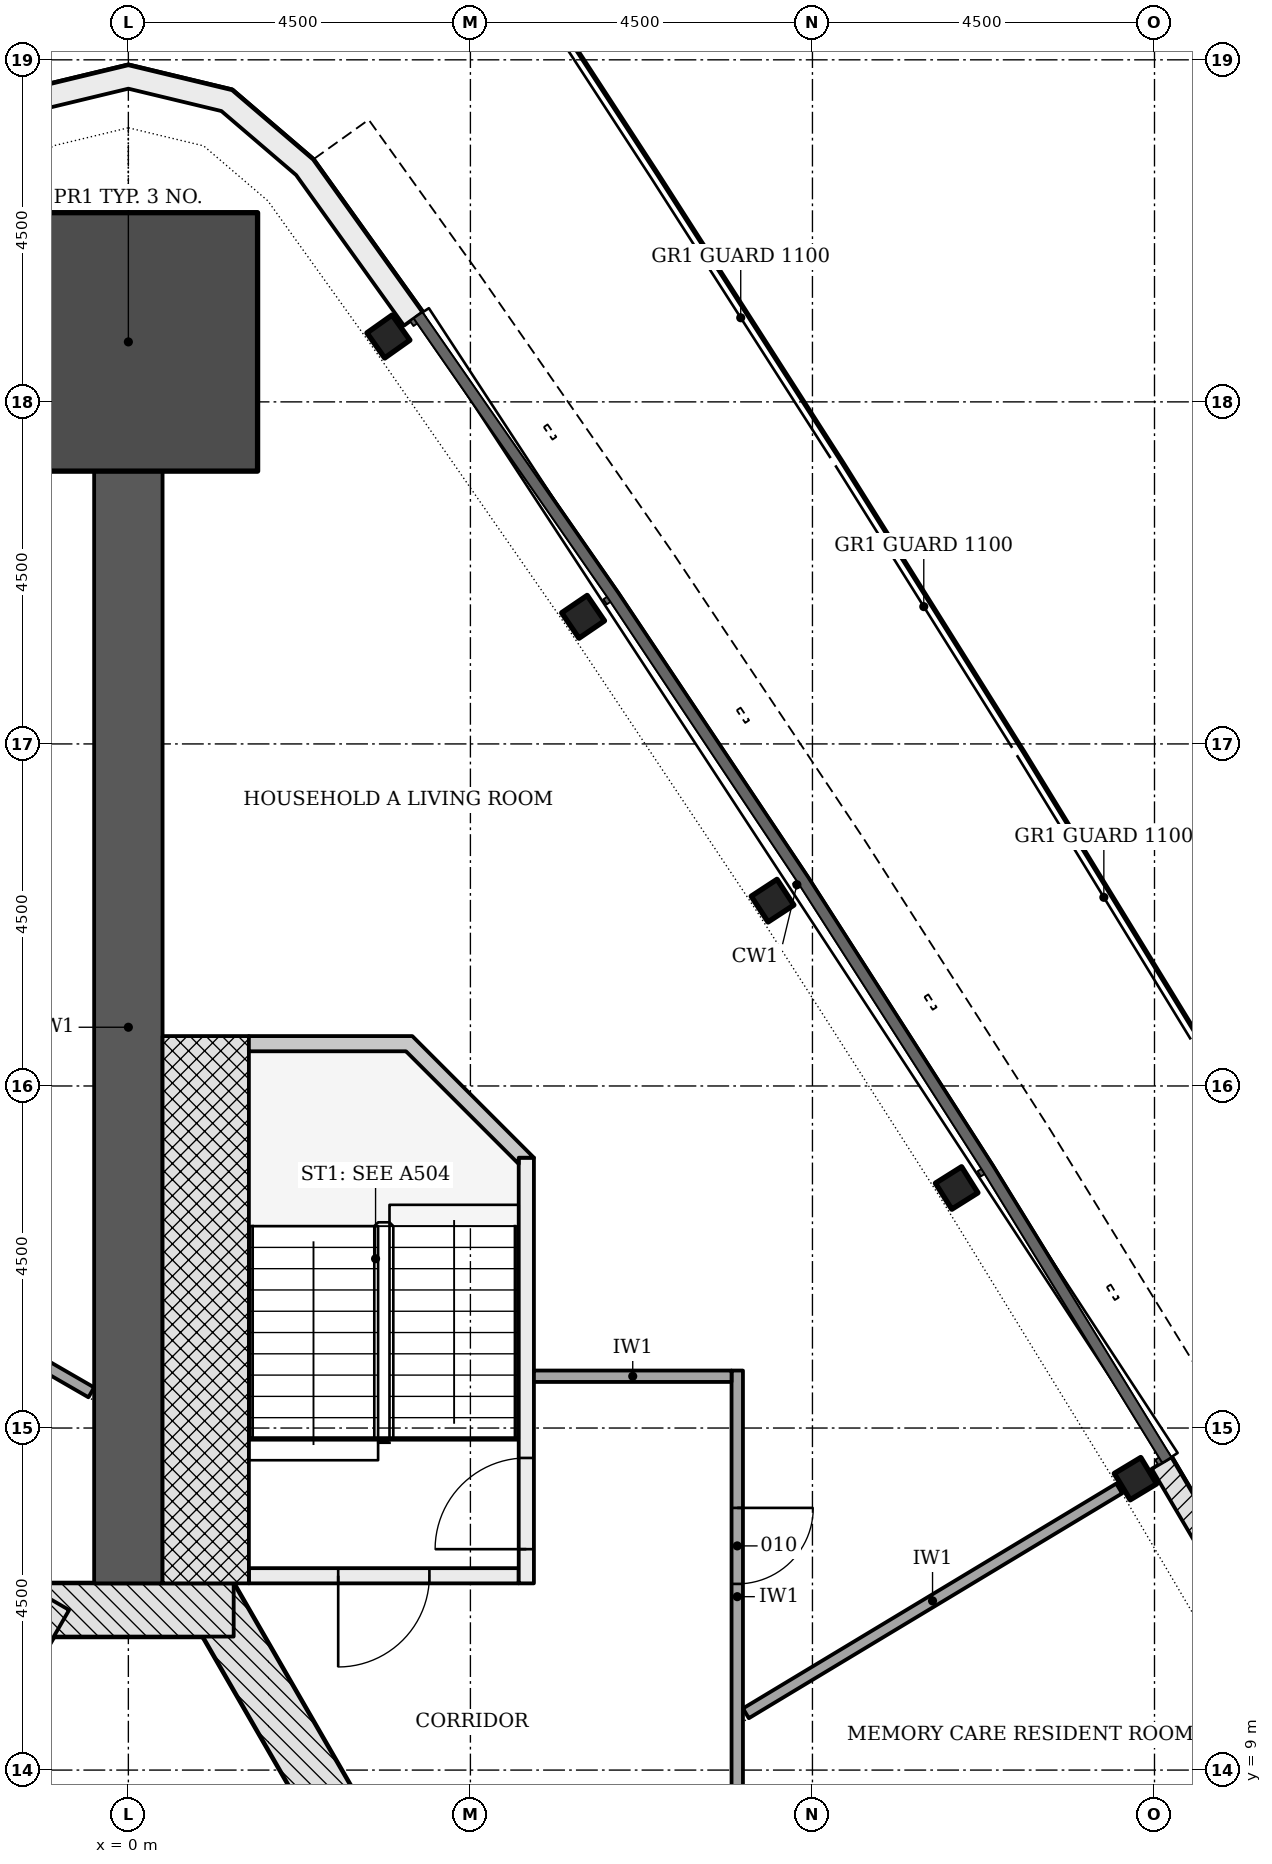
"""IFC4 building model, lengths in metres.
Left out: names, types, materials, properties, quantities, classifications, styles, units other than length and angle.
Written with IfcOpenShell. Run it as: python <this file> out.ifc"""

import sys

from ifc_helpers import new_model, si_unit, direction, frame, frame_2d, origin, origin_2d, place, context, subcontext, project, spatial, polyline, rectangle, i_section, outline, extrude, element, fill, save


model = new_model("IFC4")
c1 = context("Model", 3, precision=1e-05, world=origin(), true_north=direction((0.0, 1.0)))
c2 = subcontext(c1, "Body", "Model", "MODEL_VIEW")
j1 = project(units=[si_unit("LENGTHUNIT", "METRE"), si_unit("PLANEANGLEUNIT", "RADIAN")], contexts=[c1])
p1 = place(None, origin())
s1 = spatial("IfcSite", under=j1, at=p1, CompositionType="ELEMENT")
p2 = place(p1, origin())
s2 = spatial("IfcBuilding", under=s1, at=p2, CompositionType="ELEMENT")
p3 = place(p2, frame((0.0, 0.0, 24.0)))
s3 = spatial("IfcBuildingStorey", under=s2, at=p3, CompositionType="ELEMENT", Elevation=24.0)
p4 = place(p3, frame((10.311, -4.703, -0.2), z_axis=(0.0, 0.0, 1.0), x_axis=(-0.500001446645, 0.866024568562, 0.0)))
e1 = element("IfcWall", 1, at=p4, inside=s3, PredefinedType="SHEAR", context=c2, shape_type="SweptSolid", body=[
    extrude(rectangle(XDim=18.458, YDim=0.7, at=frame_2d((9.229, 0.0))), origin(), (0.0, 0.0, 1.0), 3.6),
])
p5 = place(p4, frame((8.7, 0.0, 0.2)))
e2 = element("IfcOpeningElement", 2, at=p5, cuts=e1, PredefinedType="OPENING", context=c2, shape_type="SweptSolid", body=[
    extrude(rectangle(XDim=1.0, YDim=2.1, at=frame_2d((0.5, 1.05))), frame((0.0, 0.36, 0.0), z_axis=(0.0, -1.0, 0.0), x_axis=(1.0, 0.0, 0.0)), (0.0, 0.0, 1.0), 0.72),
])
p6 = place(p4, frame((3.99, 0.0, 0.2)))
e3 = element("IfcOpeningElement", 3, at=p6, cuts=e1, PredefinedType="OPENING", context=c2, shape_type="SweptSolid", body=[
    extrude(rectangle(XDim=0.9, YDim=2.1, at=frame_2d((0.45, 1.05))), frame((0.0, 0.36, 0.0), z_axis=(0.0, -1.0, 0.0), x_axis=(1.0, 0.0, 0.0)), (0.0, 0.0, 1.0), 0.72),
])
p7 = place(p4, frame((13.539, 0.0, 0.2)))
e4 = element("IfcOpeningElement", 4, at=p7, cuts=e1, PredefinedType="OPENING", context=c2, shape_type="SweptSolid", body=[
    extrude(rectangle(XDim=0.9, YDim=2.1, at=frame_2d((0.45, 1.05))), frame((0.0, 0.36, 0.0), z_axis=(0.0, -1.0, 0.0), x_axis=(1.0, 0.0, 0.0)), (0.0, 0.0, 1.0), 0.72),
])
p8 = place(p3, frame((1.386, 11.106, -0.2), z_axis=(0.0, 0.0, 1.0), x_axis=(-1.0, 0.0, 0.0)))
e5 = element("IfcWall", 5, at=p8, inside=s3, PredefinedType="SHEAR", context=c2, shape_type="SweptSolid", body=[
    extrude(rectangle(XDim=2.771, YDim=0.7, at=frame_2d((1.386, 0.0))), origin(), (0.0, 0.0, 1.0), 3.6),
])
p9 = place(p3, frame((-1.083, 11.281, -0.2), z_axis=(0.0, 0.0, 1.0), x_axis=(-0.500001446645, -0.866024568562, 0.0)))
e6 = element("IfcWall", 6, at=p9, inside=s3, PredefinedType="SHEAR", context=c2, shape_type="SweptSolid", body=[
    extrude(rectangle(XDim=18.458, YDim=0.7, at=frame_2d((9.229, 0.0))), origin(), (0.0, 0.0, 1.0), 3.6),
])
p10 = place(p9, frame((8.979, 0.0, 0.2)))
e7 = element("IfcOpeningElement", 7, at=p10, cuts=e6, PredefinedType="OPENING", context=c2, shape_type="SweptSolid", body=[
    extrude(rectangle(XDim=1.2, YDim=2.1, at=frame_2d((0.6, 1.05))), frame((0.0, 0.36, 0.0), z_axis=(0.0, -1.0, 0.0), x_axis=(1.0, 0.0, 0.0)), (0.0, 0.0, 1.0), 0.72),
])
p11 = place(p9, frame((11.029, 0.0, 0.2)))
e8 = element("IfcOpeningElement", 8, at=p11, cuts=e6, PredefinedType="OPENING", context=c2, shape_type="SweptSolid", body=[
    extrude(rectangle(XDim=1.2, YDim=2.1, at=frame_2d((0.6, 1.05))), frame((0.0, 0.36, 0.0), z_axis=(0.0, -1.0, 0.0), x_axis=(1.0, 0.0, 0.0)), (0.0, 0.0, 1.0), 0.72),
])
p12 = place(p3, frame((0.0, 11.456, -0.2), z_axis=(0.0, 0.0, 1.0), x_axis=(0.0, 1.0, 0.0)))
e9 = element("IfcWall", 9, at=p12, inside=s3, PredefinedType="SHEAR", context=c2, shape_type="SweptSolid", body=[
    extrude(rectangle(XDim=14.633, YDim=0.9, at=frame_2d((7.316, 0.0))), origin(), (0.0, 0.0, 1.0), 3.6),
])
p13 = place(p3, frame((0.0, 27.789, -0.2), z_axis=(0.0, 0.0, 1.0), x_axis=(0.0, 1.0, 0.0)))
e10 = element("IfcColumn", 10, at=p13, inside=s3, PredefinedType="COLUMN", context=c2, shape_type="SweptSolid", body=[
    extrude(rectangle(XDim=3.4, YDim=3.4, at=origin_2d()), origin(), (0.0, 0.0, 1.0), 3.6),
])
for number, where, z_axis, x_axis in (
    (11, (13.25, 12.834, -0.2), (0.0, 0.0, 1.0), (-0.516, 0.857, 0.0)),
    (12, (10.897, 16.658, -0.2), (0.0, 0.0, 1.0), (-0.532, 0.847, 0.0)),
    (13, (8.475, 20.438, -0.2), (0.0, 0.0, 1.0), (-0.547, 0.837, 0.0)),
    (14, (5.982, 24.172, -0.2), (0.0, 0.0, 1.0), (-0.563, 0.827, 0.0)),
    (15, (3.421, 27.86, -0.2), (0.0, 0.0, 1.0), (-0.578, 0.816, 0.0)),
):
    element("IfcColumn", number, at=place(p3, frame(where, z_axis=z_axis, x_axis=x_axis)), inside=s3, PredefinedType="COLUMN", context=c2, shape_type="SweptSolid", body=[
        extrude(i_section(OverallWidth=0.404, OverallDepth=0.406, WebThickness=0.027, FlangeThickness=0.044, FilletRadius=0.015, at=origin_2d()), origin(), (0.0, 0.0, 1.0), 3.6),
    ])
p14 = place(p3, frame((13.593, 13.04, 0.0), z_axis=(0.0, 0.0, 1.0), x_axis=(0.507980887805, -0.861368340273, 0.0)))
e16 = element("IfcWall", 16, at=p14, inside=s3, PredefinedType="NOTDEFINED", context=c2, shape_type="SweptSolid", body=[
    extrude(rectangle(XDim=4.496, YDim=0.3, at=frame_2d((2.248, 0.0))), origin(), (0.0, 0.0, 1.0), 3.3),
])
p15 = place(p14, frame((1.648, 0.0, 0.0)))
e17 = element("IfcOpeningElement", 17, at=p15, cuts=e16, PredefinedType="OPENING", context=c2, shape_type="SweptSolid", body=[
    extrude(rectangle(XDim=1.2, YDim=2.4, at=frame_2d((0.6, 1.2))), frame((0.0, 0.16, 0.0), z_axis=(0.0, -1.0, 0.0), x_axis=(1.0, 0.0, 0.0)), (0.0, 0.0, 1.0), 0.32),
])
p16 = place(p3, origin())
e18 = element("IfcWall", 18, at=p16, inside=s3, PredefinedType="NOTDEFINED", context=c2, shape_type="SweptSolid", body=[
    extrude(outline(polyline([(3.87, 28.178), (2.43, 30.188), (1.364, 31.101), (0.0, 31.429), (-1.364, 31.101), (-2.43, 30.188), (-3.87, 28.178), (-3.626, 28.003), (-2.208, 29.984), (-1.224, 30.826), (0.0, 31.121), (1.224, 30.826), (2.208, 29.984), (3.626, 28.003), (3.87, 28.178)])), origin(), (0.0, 0.0, 1.0), 3.3),
])
p17 = place(p3, frame((5.135, 11.556, -0.2), z_axis=(0.0, 0.0, 1.0), x_axis=(-1.0, 0.0, 0.0)))
e19 = element("IfcWall", 19, at=p17, inside=s3, PredefinedType="SHEAR", context=c2, shape_type="SweptSolid", body=[
    extrude(rectangle(XDim=3.55, YDim=0.2, at=frame_2d((1.775, 0.0))), origin(), (0.0, 0.0, 1.0), 3.6),
])
p18 = place(p17, frame((1.175, 0.0, 0.2)))
e20 = element("IfcOpeningElement", 20, at=p18, cuts=e19, PredefinedType="OPENING", context=c2, shape_type="SweptSolid", body=[
    extrude(rectangle(XDim=1.2, YDim=2.1, at=frame_2d((0.6, 1.05))), frame((0.0, 0.11, 0.0), z_axis=(0.0, -1.0, 0.0), x_axis=(1.0, 0.0, 0.0)), (0.0, 0.0, 1.0), 0.22),
])
p19 = place(p3, frame((5.236, 11.456, -0.2), z_axis=(0.0, 0.0, 1.0), x_axis=(0.0, 1.0, 0.0)))
e21 = element("IfcWall", 21, at=p19, inside=s3, PredefinedType="SHEAR", context=c2, shape_type="SweptSolid", body=[
    extrude(rectangle(XDim=5.6, YDim=0.2, at=frame_2d((2.8, 0.0))), origin(), (0.0, 0.0, 1.0), 3.6),
])
p20 = place(p19, frame((0.45, 0.0, 0.2)))
e22 = element("IfcOpeningElement", 22, at=p20, cuts=e21, PredefinedType="OPENING", context=c2, shape_type="SweptSolid", body=[
    extrude(rectangle(XDim=1.2, YDim=2.1, at=frame_2d((0.6, 1.05))), frame((0.0, 0.11, 0.0), z_axis=(0.0, -1.0, 0.0), x_axis=(1.0, 0.0, 0.0)), (0.0, 0.0, 1.0), 0.22),
])
p21 = place(p3, frame((1.018, 11.456, -0.2), z_axis=(0.0, 0.0, 1.0), x_axis=(0.0, 1.0, 0.0)))
e23 = element("IfcWall", 23, at=p21, inside=s3, PredefinedType="SHEAR", context=c2, shape_type="SweptSolid", body=[
    extrude(rectangle(XDim=7.2, YDim=1.136, at=frame_2d((3.6, 0.0))), origin(), (0.0, 0.0, 1.0), 3.6),
])
p22 = place(p3, frame((0.0, 0.0, -0.2)))
e24 = element("IfcWall", 24, at=p22, inside=s3, PredefinedType="SHEAR", context=c2, shape_type="SweptSolid", body=[
    extrude(outline(polyline([(5.336, 17.056), (3.736, 18.656), (1.586, 18.656), (1.586, 18.456), (3.653, 18.456), (5.135, 16.974), (5.135, 17.056), (5.135, 17.056), (5.135, 17.056), (5.135, 17.056), (5.135, 17.056), (5.135, 17.056), (5.135, 17.056), (5.135, 17.056), (5.135, 17.056), (5.135, 17.056), (5.135, 17.056), (5.135, 17.056), (5.135, 17.056), (5.135, 17.056), (5.135, 17.056), (5.135, 17.056), (5.135, 17.056), (5.336, 17.056)])), origin(), (0.0, 0.0, 1.0), 3.6),
])
p23 = place(p3, frame((8.01, 14.256, 0.0), z_axis=(0.0, 0.0, 1.0), x_axis=(0.0, -1.0, 0.0)))
e25 = element("IfcWall", 25, at=p23, inside=s3, PredefinedType="PARTITIONING", context=c2, shape_type="SweptSolid", body=[
    extrude(rectangle(XDim=5.95, YDim=0.15, at=frame_2d((2.975, 0.0))), origin(), (0.0, 0.0, 1.0), 2.768),
])
p24 = place(p23, frame((1.807, 0.0, 0.0)))
e26 = element("IfcOpeningElement", 26, at=p24, cuts=e25, PredefinedType="OPENING", context=c2, shape_type="SweptSolid", body=[
    extrude(rectangle(XDim=1.0, YDim=2.1, at=frame_2d((0.5, 1.05))), frame((0.0, 0.085, 0.0), z_axis=(0.0, -1.0, 0.0), x_axis=(1.0, 0.0, 0.0)), (0.0, 0.0, 1.0), 0.17),
])
p25 = place(p3, frame((-5.312, 16.755, 0.0), z_axis=(0.0, 0.0, 1.0), x_axis=(0.866028693448, -0.499994302092, 0.0)))
e27 = element("IfcWall", 27, at=p25, inside=s3, PredefinedType="PARTITIONING", context=c2, shape_type="SweptSolid", body=[
    extrude(rectangle(XDim=5.571, YDim=0.15, at=frame_2d((2.786, 0.0))), origin(), (0.0, 0.0, 1.0), 3.4),
])
p26 = place(p25, frame((2.045, 0.0, 0.0)))
e28 = element("IfcOpeningElement", 28, at=p26, cuts=e27, PredefinedType="OPENING", context=c2, shape_type="SweptSolid", body=[
    extrude(rectangle(XDim=1.5, YDim=2.1, at=frame_2d((0.75, 1.05))), frame((0.0, 0.085, 0.0), z_axis=(0.0, -1.0, 0.0), x_axis=(1.0, 0.0, 0.0)), (0.0, 0.0, 1.0), 0.17),
])
p27 = place(p3, frame((5.336, 14.181, 0.0), z_axis=(0.0, 0.0, 1.0), x_axis=(1.0, 0.0, 0.0)))
e29 = element("IfcWall", 29, at=p27, inside=s3, PredefinedType="PARTITIONING", context=c2, shape_type="SweptSolid", body=[
    extrude(rectangle(XDim=2.6, YDim=0.15, at=frame_2d((1.3, 0.0))), origin(), (0.0, 0.0, 1.0), 2.923),
])
p28 = place(p3, frame((15.314, 8.842, 0.0), z_axis=(0.0, 0.0, 1.0), x_axis=(-0.866015124653, -0.500017803555, 0.0)))
e30 = element("IfcWall", 30, at=p28, inside=s3, PredefinedType="PARTITIONING", context=c2, shape_type="SweptSolid", body=[
    extrude(rectangle(XDim=8.205, YDim=0.15, at=frame_2d((4.103, 0.0))), origin(), (0.0, 0.0, 1.0), 2.768),
])
p29 = place(p3, frame((13.036, 12.705, 0.0), z_axis=(0.0, 0.0, 1.0), x_axis=(-0.856612490534, -0.515960309579, 0.0)))
e31 = element("IfcWall", 31, at=p29, inside=s3, PredefinedType="PARTITIONING", context=c2, shape_type="SweptSolid", body=[
    extrude(rectangle(XDim=5.733, YDim=0.15, at=frame_2d((2.867, 0.0))), origin(), (0.0, 0.0, 1.0), 2.768),
])
p30 = place(p18, origin())
e32 = element("IfcDoor", 32, at=p30, inside=s3, OperationType="SINGLE_SWING_RIGHT", PredefinedType="DOOR", context=c2, shape_type="SweptSolid", body=[
    extrude(rectangle(XDim=1.2, YDim=2.1, at=frame_2d((0.6, 1.05))), frame((0.0, 0.025, 0.0), z_axis=(0.0, -1.0, 0.0), x_axis=(1.0, 0.0, 0.0)), (0.0, 0.0, 1.0), 0.05),
])
fill(e20, e32)
p31 = place(p20, origin())
e33 = element("IfcDoor", 33, at=p31, inside=s3, OperationType="SINGLE_SWING_LEFT", PredefinedType="DOOR", context=c2, shape_type="SweptSolid", body=[
    extrude(rectangle(XDim=1.2, YDim=2.1, at=frame_2d((0.6, 1.05))), frame((0.0, 0.025, 0.0), z_axis=(0.0, -1.0, 0.0), x_axis=(1.0, 0.0, 0.0)), (0.0, 0.0, 1.0), 0.05),
])
fill(e22, e33)
p32 = place(p24, origin())
e34 = element("IfcDoor", 34, at=p32, inside=s3, OperationType="SINGLE_SWING_LEFT", PredefinedType="DOOR", context=c2, shape_type="SweptSolid", body=[
    extrude(rectangle(XDim=1.0, YDim=2.1, at=frame_2d((0.5, 1.05))), frame((0.0, 0.025, 0.0), z_axis=(0.0, -1.0, 0.0), x_axis=(1.0, 0.0, 0.0)), (0.0, 0.0, 1.0), 0.05),
])
fill(e26, e34)
save(model, sys.argv[1])
